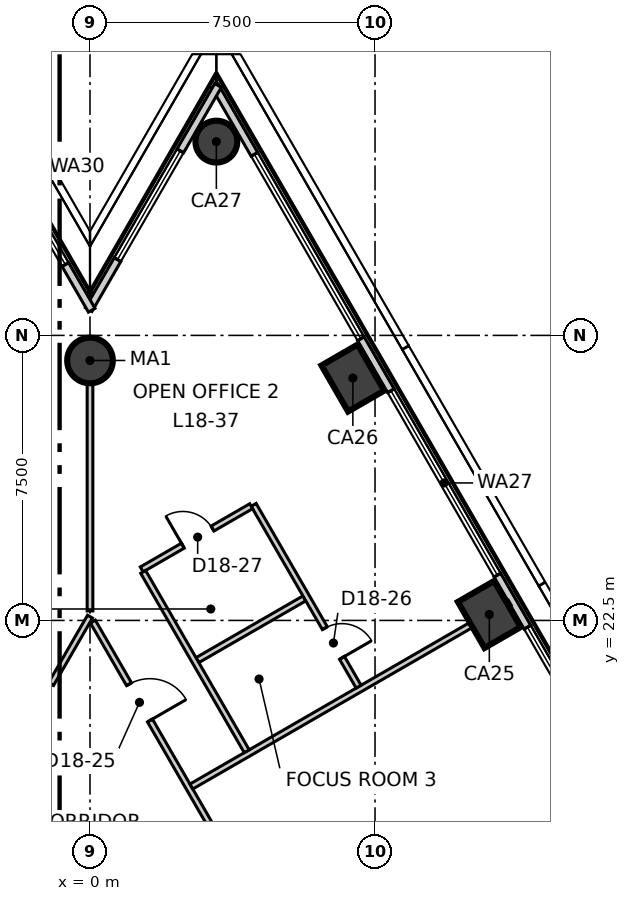
"""IFC4 building model, lengths in metres.
Left out: names, types, materials, properties, quantities, classifications, styles, units other than length and angle.
Written with IfcOpenShell. Run it as: python <this file> out.ifc"""

import sys

from ifc_helpers import new_model, si_unit, direction, frame, frame_2d, origin, origin_2d, place, context, subcontext, project, spatial, rectangle, circle, extrude, element, fill, save


model = new_model("IFC4")
c1 = context("Model", 3, precision=1e-05, world=origin(), true_north=direction((0.0, 1.0)))
c2 = subcontext(c1, "Body", "Model", "MODEL_VIEW")
j1 = project(units=[si_unit("LENGTHUNIT", "METRE"), si_unit("PLANEANGLEUNIT", "RADIAN")], contexts=[c1])
p1 = place(None, origin())
s1 = spatial("IfcSite", under=j1, at=p1, CompositionType="ELEMENT")
p2 = place(p1, origin())
s2 = spatial("IfcBuilding", under=s1, at=p2, CompositionType="ELEMENT")
p3 = place(p2, frame((0.0, 0.0, 83.3)))
s3 = spatial("IfcBuildingStorey", under=s2, at=p3, CompositionType="ELEMENT", Elevation=83.3)
for number, where, z_axis, x_axis in (
    (1, (10.508, 22.657, -0.3), (0.0, 0.0, 1.0), (-0.5, 0.866, 0.0)),
    (2, (6.917, 28.878, -0.3), (0.0, 0.0, 1.0), (-0.5, 0.866, 0.0)),
):
    element("IfcColumn", number, at=place(p3, frame(where, z_axis=z_axis, x_axis=x_axis)), inside=s3, PredefinedType="COLUMN", context=c2, shape_type="SweptSolid", body=[
        extrude(rectangle(XDim=1.4, YDim=1.1, at=origin_2d()), origin(), (0.0, 0.0, 1.0), 4.0),
    ])
p4 = place(p3, frame((3.325, 35.099, -0.3), z_axis=(0.0, 0.0, 1.0), x_axis=(-0.5, 0.866025403784, 0.0)))
e3 = element("IfcColumn", 3, at=p4, inside=s3, PredefinedType="COLUMN", context=c2, shape_type="SweptSolid", body=[
    extrude(circle(Radius=0.55, at=origin_2d()), origin(), (0.0, 0.0, 1.0), 4.0),
])
p5 = place(p3, frame((0.0, 29.34, -0.3), z_axis=(0.0, 0.0, 1.0), x_axis=(1.0, 0.0, 0.0)))
e4 = element("IfcColumn", 4, at=p5, inside=s3, PredefinedType="COLUMN", context=c2, shape_type="SweptSolid", body=[
    extrude(circle(Radius=0.6, at=origin_2d()), origin(), (0.0, 0.0, 1.0), 4.0),
])
p6 = place(p3, frame((33.317, -15.448, 0.0), z_axis=(0.0, 0.0, 1.0), x_axis=(-0.499999874703, 0.866025476125, 0.0)))
e5 = element("IfcWall", 5, at=p6, inside=s3, PredefinedType="ELEMENTEDWALL", context=c2, shape_type="SweptSolid", body=[
    extrude(rectangle(XDim=60.054, YDim=0.2, at=frame_2d((30.027, 0.0))), origin(), (0.0, 0.0, 1.0), 3.7),
])
p7 = place(p6, frame((2.094, 0.0, 0.9)))
e6 = element("IfcOpeningElement", 6, at=p7, cuts=e5, PredefinedType="OPENING", context=c2, shape_type="SweptSolid", body=[
    extrude(rectangle(XDim=5.6, YDim=2.5, at=frame_2d((2.8, 1.25))), frame((0.0, 0.11, 0.0), z_axis=(0.0, -1.0, 0.0), x_axis=(1.0, 0.0, 0.0)), (0.0, 0.0, 1.0), 0.22),
])
p8 = place(p6, frame((9.278, 0.0, 0.9)))
e7 = element("IfcOpeningElement", 7, at=p8, cuts=e5, PredefinedType="OPENING", context=c2, shape_type="SweptSolid", body=[
    extrude(rectangle(XDim=5.6, YDim=2.5, at=frame_2d((2.8, 1.25))), frame((0.0, 0.11, 0.0), z_axis=(0.0, -1.0, 0.0), x_axis=(1.0, 0.0, 0.0)), (0.0, 0.0, 1.0), 0.22),
])
p9 = place(p6, frame((16.462, 0.0, 0.9)))
e8 = element("IfcOpeningElement", 8, at=p9, cuts=e5, PredefinedType="OPENING", context=c2, shape_type="SweptSolid", body=[
    extrude(rectangle(XDim=5.6, YDim=2.5, at=frame_2d((2.8, 1.25))), frame((0.0, 0.11, 0.0), z_axis=(0.0, -1.0, 0.0), x_axis=(1.0, 0.0, 0.0)), (0.0, 0.0, 1.0), 0.22),
])
p10 = place(p6, frame((23.645, 0.0, 0.9)))
e9 = element("IfcOpeningElement", 9, at=p10, cuts=e5, PredefinedType="OPENING", context=c2, shape_type="SweptSolid", body=[
    extrude(rectangle(XDim=5.6, YDim=2.5, at=frame_2d((2.8, 1.25))), frame((0.0, 0.11, 0.0), z_axis=(0.0, -1.0, 0.0), x_axis=(1.0, 0.0, 0.0)), (0.0, 0.0, 1.0), 0.22),
])
p11 = place(p6, frame((30.829, 0.0, 0.9)))
e10 = element("IfcOpeningElement", 10, at=p11, cuts=e5, PredefinedType="OPENING", context=c2, shape_type="SweptSolid", body=[
    extrude(rectangle(XDim=5.6, YDim=2.5, at=frame_2d((2.8, 1.25))), frame((0.0, 0.11, 0.0), z_axis=(0.0, -1.0, 0.0), x_axis=(1.0, 0.0, 0.0)), (0.0, 0.0, 1.0), 0.22),
])
p12 = place(p6, frame((38.012, 0.0, 0.9)))
e11 = element("IfcOpeningElement", 11, at=p12, cuts=e5, PredefinedType="OPENING", context=c2, shape_type="SweptSolid", body=[
    extrude(rectangle(XDim=5.6, YDim=2.5, at=frame_2d((2.8, 1.25))), frame((0.0, 0.11, 0.0), z_axis=(0.0, -1.0, 0.0), x_axis=(1.0, 0.0, 0.0)), (0.0, 0.0, 1.0), 0.22),
])
p13 = place(p6, frame((45.196, 0.0, 0.9)))
e12 = element("IfcOpeningElement", 12, at=p13, cuts=e5, PredefinedType="OPENING", context=c2, shape_type="SweptSolid", body=[
    extrude(rectangle(XDim=5.6, YDim=2.5, at=frame_2d((2.8, 1.25))), frame((0.0, 0.11, 0.0), z_axis=(0.0, -1.0, 0.0), x_axis=(1.0, 0.0, 0.0)), (0.0, 0.0, 1.0), 0.22),
])
p14 = place(p6, frame((52.379, 0.0, 0.9)))
e13 = element("IfcOpeningElement", 13, at=p14, cuts=e5, PredefinedType="OPENING", context=c2, shape_type="SweptSolid", body=[
    extrude(rectangle(XDim=5.6, YDim=2.5, at=frame_2d((2.8, 1.25))), frame((0.0, 0.11, 0.0), z_axis=(0.0, -1.0, 0.0), x_axis=(1.0, 0.0, 0.0)), (0.0, 0.0, 1.0), 0.22),
])
p15 = place(p3, frame((3.37, 36.577, 0.0), z_axis=(0.0, 0.0, 1.0), x_axis=(-0.499983120418, -0.866035148996, 0.0)))
e14 = element("IfcWall", 14, at=p15, inside=s3, PredefinedType="ELEMENTEDWALL", context=c2, shape_type="SweptSolid", body=[
    extrude(rectangle(XDim=6.81, YDim=0.2, at=frame_2d((3.405, 0.0))), origin(), (0.0, 0.0, 1.0), 3.7),
])
p16 = place(p15, frame((1.99, 0.0, 0.9)))
e15 = element("IfcOpeningElement", 15, at=p16, cuts=e14, PredefinedType="OPENING", context=c2, shape_type="SweptSolid", body=[
    extrude(rectangle(XDim=3.3, YDim=2.5, at=frame_2d((1.65, 1.25))), frame((0.0, 0.11, 0.0), z_axis=(0.0, -1.0, 0.0), x_axis=(1.0, 0.0, 0.0)), (0.0, 0.0, 1.0), 0.22),
])
p17 = place(p3, frame((0.045, 30.662, 0.0), z_axis=(0.0, 0.0, 1.0), x_axis=(-0.499983120418, 0.866035148996, 0.0)))
e16 = element("IfcWall", 16, at=p17, inside=s3, PredefinedType="ELEMENTEDWALL", context=c2, shape_type="SweptSolid", body=[
    extrude(rectangle(XDim=6.81, YDim=0.2, at=frame_2d((3.405, 0.0))), origin(), (0.0, 0.0, 1.0), 3.7),
])
p18 = place(p17, frame((1.39, 0.0, 0.9)))
e17 = element("IfcOpeningElement", 17, at=p18, cuts=e16, PredefinedType="OPENING", context=c2, shape_type="SweptSolid", body=[
    extrude(rectangle(XDim=3.3, YDim=2.5, at=frame_2d((1.65, 1.25))), frame((0.0, 0.11, 0.0), z_axis=(0.0, -1.0, 0.0), x_axis=(1.0, 0.0, 0.0)), (0.0, 0.0, 1.0), 0.22),
])
p19 = place(p3, frame((-19.497, -11.17, 0.0), z_axis=(0.0, 0.0, 1.0), x_axis=(0.499998854553, 0.866026065108, 0.0)))
e18 = element("IfcWall", 18, at=p19, inside=s3, PredefinedType="PARTITIONING", context=c2, shape_type="SweptSolid", body=[
    extrude(rectangle(XDim=38.994, YDim=0.15, at=frame_2d((19.497, 0.0))), origin(), (0.0, 0.0, 1.0), 3.7),
])
p20 = place(p19, frame((35.844, 0.0, 0.0)))
e19 = element("IfcOpeningElement", 19, at=p20, cuts=e18, PredefinedType="OPENING", context=c2, shape_type="SweptSolid", body=[
    extrude(rectangle(XDim=1.1, YDim=2.1, at=frame_2d((0.55, 1.05))), frame((0.0, 0.085, 0.0), z_axis=(0.0, -1.0, 0.0), x_axis=(1.0, 0.0, 0.0)), (0.0, 0.0, 1.0), 0.17),
])
p21 = place(p19, frame((26.04, 0.0, 0.0)))
e20 = element("IfcOpeningElement", 20, at=p21, cuts=e18, PredefinedType="OPENING", context=c2, shape_type="SweptSolid", body=[
    extrude(rectangle(XDim=1.1, YDim=2.1, at=frame_2d((0.55, 1.05))), frame((0.0, 0.085, 0.0), z_axis=(0.0, -1.0, 0.0), x_axis=(1.0, 0.0, 0.0)), (0.0, 0.0, 1.0), 0.17),
])
p22 = place(p19, frame((7.272, 0.0, 0.0)))
e21 = element("IfcOpeningElement", 21, at=p22, cuts=e18, PredefinedType="OPENING", context=c2, shape_type="SweptSolid", body=[
    extrude(rectangle(XDim=1.1, YDim=2.1, at=frame_2d((0.55, 1.05))), frame((0.0, 0.085, 0.0), z_axis=(0.0, -1.0, 0.0), x_axis=(1.0, 0.0, 0.0)), (0.0, 0.0, 1.0), 0.17),
])
p23 = place(p19, frame((17.372, 0.0, 0.0)))
e22 = element("IfcOpeningElement", 22, at=p23, cuts=e18, PredefinedType="OPENING", context=c2, shape_type="SweptSolid", body=[
    extrude(rectangle(XDim=0.9, YDim=2.1, at=frame_2d((0.45, 1.05))), frame((0.0, 0.085, 0.0), z_axis=(0.0, -1.0, 0.0), x_axis=(1.0, 0.0, 0.0)), (0.0, 0.0, 1.0), 0.17),
])
p24 = place(p19, frame((14.172, 0.0, 0.0)))
e23 = element("IfcOpeningElement", 23, at=p24, cuts=e18, PredefinedType="OPENING", context=c2, shape_type="SweptSolid", body=[
    extrude(rectangle(XDim=0.9, YDim=2.1, at=frame_2d((0.45, 1.05))), frame((0.0, 0.085, 0.0), z_axis=(0.0, -1.0, 0.0), x_axis=(1.0, 0.0, 0.0)), (0.0, 0.0, 1.0), 0.17),
])
p25 = place(p19, frame((11.272, 0.0, 0.0)))
e24 = element("IfcOpeningElement", 24, at=p25, cuts=e18, PredefinedType="OPENING", context=c2, shape_type="SweptSolid", body=[
    extrude(rectangle(XDim=1.0, YDim=2.1, at=frame_2d((0.5, 1.05))), frame((0.0, 0.085, 0.0), z_axis=(0.0, -1.0, 0.0), x_axis=(1.0, 0.0, 0.0)), (0.0, 0.0, 1.0), 0.17),
])
p26 = place(p19, frame((1.904, 0.0, 0.0)))
e25 = element("IfcOpeningElement", 25, at=p26, cuts=e18, PredefinedType="OPENING", context=c2, shape_type="SweptSolid", body=[
    extrude(rectangle(XDim=1.1, YDim=2.1, at=frame_2d((0.55, 1.05))), frame((0.0, 0.085, 0.0), z_axis=(0.0, -1.0, 0.0), x_axis=(1.0, 0.0, 0.0)), (0.0, 0.0, 1.0), 0.17),
])
p27 = place(p3, frame((0.0, 22.75, 0.0), z_axis=(0.0, 0.0, 1.0), x_axis=(0.0, 1.0, 0.0)))
e26 = element("IfcWall", 26, at=p27, inside=s3, PredefinedType="PARTITIONING", context=c2, shape_type="SweptSolid", body=[
    extrude(rectangle(XDim=7.21, YDim=0.15, at=frame_2d((3.605, 0.0))), origin(), (0.0, 0.0, 1.0), 3.15),
])
p28 = place(p3, frame((0.075, 22.47, 0.0), z_axis=(0.0, 0.0, 1.0), x_axis=(0.500002280369, -0.866024087209, 0.0)))
e27 = element("IfcWall", 27, at=p28, inside=s3, PredefinedType="PARTITIONING", context=c2, shape_type="SweptSolid", body=[
    extrude(rectangle(XDim=38.844, YDim=0.15, at=frame_2d((19.422, 0.0))), origin(), (0.0, 0.0, 1.0), 3.7),
])
p29 = place(p28, frame((35.844, 0.0, 0.0)))
e28 = element("IfcOpeningElement", 28, at=p29, cuts=e27, PredefinedType="OPENING", context=c2, shape_type="SweptSolid", body=[
    extrude(rectangle(XDim=1.1, YDim=2.1, at=frame_2d((0.55, 1.05))), frame((0.0, 0.085, 0.0), z_axis=(0.0, -1.0, 0.0), x_axis=(1.0, 0.0, 0.0)), (0.0, 0.0, 1.0), 0.17),
])
p30 = place(p28, frame((14.44, 0.0, 0.0)))
e29 = element("IfcOpeningElement", 29, at=p30, cuts=e27, PredefinedType="OPENING", context=c2, shape_type="SweptSolid", body=[
    extrude(rectangle(XDim=1.1, YDim=2.1, at=frame_2d((0.55, 1.05))), frame((0.0, 0.085, 0.0), z_axis=(0.0, -1.0, 0.0), x_axis=(1.0, 0.0, 0.0)), (0.0, 0.0, 1.0), 0.17),
])
p31 = place(p28, frame((31.74, 0.0, 0.0)))
e30 = element("IfcOpeningElement", 30, at=p31, cuts=e27, PredefinedType="OPENING", context=c2, shape_type="SweptSolid", body=[
    extrude(rectangle(XDim=0.9, YDim=2.1, at=frame_2d((0.45, 1.05))), frame((0.0, 0.085, 0.0), z_axis=(0.0, -1.0, 0.0), x_axis=(1.0, 0.0, 0.0)), (0.0, 0.0, 1.0), 0.17),
])
p32 = place(p28, frame((28.54, 0.0, 0.0)))
e31 = element("IfcOpeningElement", 31, at=p32, cuts=e27, PredefinedType="OPENING", context=c2, shape_type="SweptSolid", body=[
    extrude(rectangle(XDim=0.9, YDim=2.1, at=frame_2d((0.45, 1.05))), frame((0.0, 0.085, 0.0), z_axis=(0.0, -1.0, 0.0), x_axis=(1.0, 0.0, 0.0)), (0.0, 0.0, 1.0), 0.17),
])
p33 = place(p28, frame((25.74, 0.0, 0.0)))
e32 = element("IfcOpeningElement", 32, at=p33, cuts=e27, PredefinedType="OPENING", context=c2, shape_type="SweptSolid", body=[
    extrude(rectangle(XDim=1.0, YDim=2.1, at=frame_2d((0.5, 1.05))), frame((0.0, 0.085, 0.0), z_axis=(0.0, -1.0, 0.0), x_axis=(1.0, 0.0, 0.0)), (0.0, 0.0, 1.0), 0.17),
])
p34 = place(p28, frame((1.905, 0.0, 0.0)))
e33 = element("IfcOpeningElement", 33, at=p34, cuts=e27, PredefinedType="OPENING", context=c2, shape_type="SweptSolid", body=[
    extrude(rectangle(XDim=1.1, YDim=2.1, at=frame_2d((0.55, 1.05))), frame((0.0, 0.085, 0.0), z_axis=(0.0, -1.0, 0.0), x_axis=(1.0, 0.0, 0.0)), (0.0, 0.0, 1.0), 0.17),
])
p35 = place(p3, frame((2.667, 18.13, 0.0), z_axis=(0.0, 0.0, 1.0), x_axis=(0.866018320735, 0.500012268001, 0.0)))
e34 = element("IfcWall", 34, at=p35, inside=s3, PredefinedType="PARTITIONING", context=c2, shape_type="SweptSolid", body=[
    extrude(rectangle(XDim=9.674, YDim=0.15, at=frame_2d((4.837, 0.0))), origin(), (0.0, 0.0, 1.0), 3.7),
])
p36 = place(p3, frame((2.826, 21.455, 0.0), z_axis=(0.0, 0.0, 1.0), x_axis=(0.866071776036, 0.499919672301, 0.0)))
e35 = element("IfcWall", 35, at=p36, inside=s3, PredefinedType="PARTITIONING", context=c2, shape_type="SweptSolid", body=[
    extrude(rectangle(XDim=3.25, YDim=0.15, at=frame_2d((1.625, 0.0))), origin(), (0.0, 0.0, 1.0), 3.7),
])
p37 = place(p3, frame((4.306, 25.542, 0.0), z_axis=(0.0, 0.0, 1.0), x_axis=(0.500027228848, -0.866009682631, 0.0)))
e36 = element("IfcWall", 36, at=p37, inside=s3, PredefinedType="PARTITIONING", context=c2, shape_type="SweptSolid", body=[
    extrude(rectangle(XDim=5.524, YDim=0.15, at=frame_2d((2.762, 0.0))), origin(), (0.0, 0.0, 1.0), 3.7),
])
p38 = place(p37, frame((3.749, 0.0, 0.0)))
e37 = element("IfcOpeningElement", 37, at=p38, cuts=e36, PredefinedType="OPENING", context=c2, shape_type="SweptSolid", body=[
    extrude(rectangle(XDim=0.9, YDim=2.1, at=frame_2d((0.45, 1.05))), frame((0.0, 0.085, 0.0), z_axis=(0.0, -1.0, 0.0), x_axis=(1.0, 0.0, 0.0)), (0.0, 0.0, 1.0), 0.17),
])
p39 = place(p3, frame((1.361, 23.842, 0.0), z_axis=(0.0, 0.0, 1.0), x_axis=(0.866007085157, 0.500031727451, 0.0)))
e38 = element("IfcWall", 38, at=p39, inside=s3, PredefinedType="PARTITIONING", context=c2, shape_type="SweptSolid", body=[
    extrude(rectangle(XDim=3.325, YDim=0.15, at=frame_2d((1.663, 0.0))), origin(), (0.0, 0.0, 1.0), 3.7),
])
p40 = place(p39, frame((1.25, 0.0, 0.0)))
e39 = element("IfcOpeningElement", 39, at=p40, cuts=e38, PredefinedType="OPENING", context=c2, shape_type="SweptSolid", body=[
    extrude(rectangle(XDim=0.9, YDim=2.1, at=frame_2d((0.45, 1.05))), frame((0.0, 0.085, 0.0), z_axis=(0.0, -1.0, 0.0), x_axis=(1.0, 0.0, 0.0)), (0.0, 0.0, 1.0), 0.17),
])
p41 = place(p3, frame((1.399, 23.777, 0.0), z_axis=(0.0, 0.0, 1.0), x_axis=(0.500080528864, -0.865978905431, 0.0)))
e40 = element("IfcWall", 40, at=p41, inside=s3, PredefinedType="PARTITIONING", context=c2, shape_type="SweptSolid", body=[
    extrude(rectangle(XDim=5.449, YDim=0.15, at=frame_2d((2.725, 0.0))), origin(), (0.0, 0.0, 1.0), 3.7),
])
p42 = place(p12, origin())
e41 = element("IfcWindow", 41, at=p42, inside=s3, PartitioningType="SINGLE_PANEL", PredefinedType="WINDOW", context=c2, shape_type="SweptSolid", body=[
    extrude(rectangle(XDim=5.6, YDim=2.5, at=frame_2d((2.8, 1.25))), frame((0.0, 0.03, 0.0), z_axis=(0.0, -1.0, 0.0), x_axis=(1.0, 0.0, 0.0)), (0.0, 0.0, 1.0), 0.06),
])
fill(e11, e41)
p43 = place(p13, origin())
e42 = element("IfcWindow", 42, at=p43, inside=s3, PartitioningType="SINGLE_PANEL", PredefinedType="WINDOW", context=c2, shape_type="SweptSolid", body=[
    extrude(rectangle(XDim=5.6, YDim=2.5, at=frame_2d((2.8, 1.25))), frame((0.0, 0.03, 0.0), z_axis=(0.0, -1.0, 0.0), x_axis=(1.0, 0.0, 0.0)), (0.0, 0.0, 1.0), 0.06),
])
fill(e12, e42)
p44 = place(p14, origin())
e43 = element("IfcWindow", 43, at=p44, inside=s3, PartitioningType="SINGLE_PANEL", PredefinedType="WINDOW", context=c2, shape_type="SweptSolid", body=[
    extrude(rectangle(XDim=5.6, YDim=2.5, at=frame_2d((2.8, 1.25))), frame((0.0, 0.03, 0.0), z_axis=(0.0, -1.0, 0.0), x_axis=(1.0, 0.0, 0.0)), (0.0, 0.0, 1.0), 0.06),
])
fill(e13, e43)
p45 = place(p16, origin())
e44 = element("IfcWindow", 44, at=p45, inside=s3, PartitioningType="SINGLE_PANEL", PredefinedType="WINDOW", context=c2, shape_type="SweptSolid", body=[
    extrude(rectangle(XDim=3.3, YDim=2.5, at=frame_2d((1.65, 1.25))), frame((0.0, 0.03, 0.0), z_axis=(0.0, -1.0, 0.0), x_axis=(1.0, 0.0, 0.0)), (0.0, 0.0, 1.0), 0.06),
])
fill(e15, e44)
p46 = place(p18, origin())
e45 = element("IfcWindow", 45, at=p46, inside=s3, PartitioningType="SINGLE_PANEL", PredefinedType="WINDOW", context=c2, shape_type="SweptSolid", body=[
    extrude(rectangle(XDim=3.3, YDim=2.5, at=frame_2d((1.65, 1.25))), frame((0.0, 0.03, 0.0), z_axis=(0.0, -1.0, 0.0), x_axis=(1.0, 0.0, 0.0)), (0.0, 0.0, 1.0), 0.06),
])
fill(e17, e45)
p47 = place(p34, origin())
e46 = element("IfcDoor", 46, at=p47, inside=s3, OperationType="SINGLE_SWING_LEFT", PredefinedType="DOOR", context=c2, shape_type="SweptSolid", body=[
    extrude(rectangle(XDim=1.1, YDim=2.1, at=frame_2d((0.55, 1.05))), frame((0.0, 0.025, 0.0), z_axis=(0.0, -1.0, 0.0), x_axis=(1.0, 0.0, 0.0)), (0.0, 0.0, 1.0), 0.05),
])
fill(e33, e46)
p48 = place(p38, origin())
e47 = element("IfcDoor", 47, at=p48, inside=s3, OperationType="SINGLE_SWING_LEFT", PredefinedType="DOOR", context=c2, shape_type="SweptSolid", body=[
    extrude(rectangle(XDim=0.9, YDim=2.1, at=frame_2d((0.45, 1.05))), frame((0.0, 0.025, 0.0), z_axis=(0.0, -1.0, 0.0), x_axis=(1.0, 0.0, 0.0)), (0.0, 0.0, 1.0), 0.05),
])
fill(e37, e47)
p49 = place(p40, origin())
e48 = element("IfcDoor", 48, at=p49, inside=s3, OperationType="SINGLE_SWING_RIGHT", PredefinedType="DOOR", context=c2, shape_type="SweptSolid", body=[
    extrude(rectangle(XDim=0.9, YDim=2.1, at=frame_2d((0.45, 1.05))), frame((0.0, 0.025, 0.0), z_axis=(0.0, -1.0, 0.0), x_axis=(1.0, 0.0, 0.0)), (0.0, 0.0, 1.0), 0.05),
])
fill(e39, e48)
save(model, sys.argv[1])
